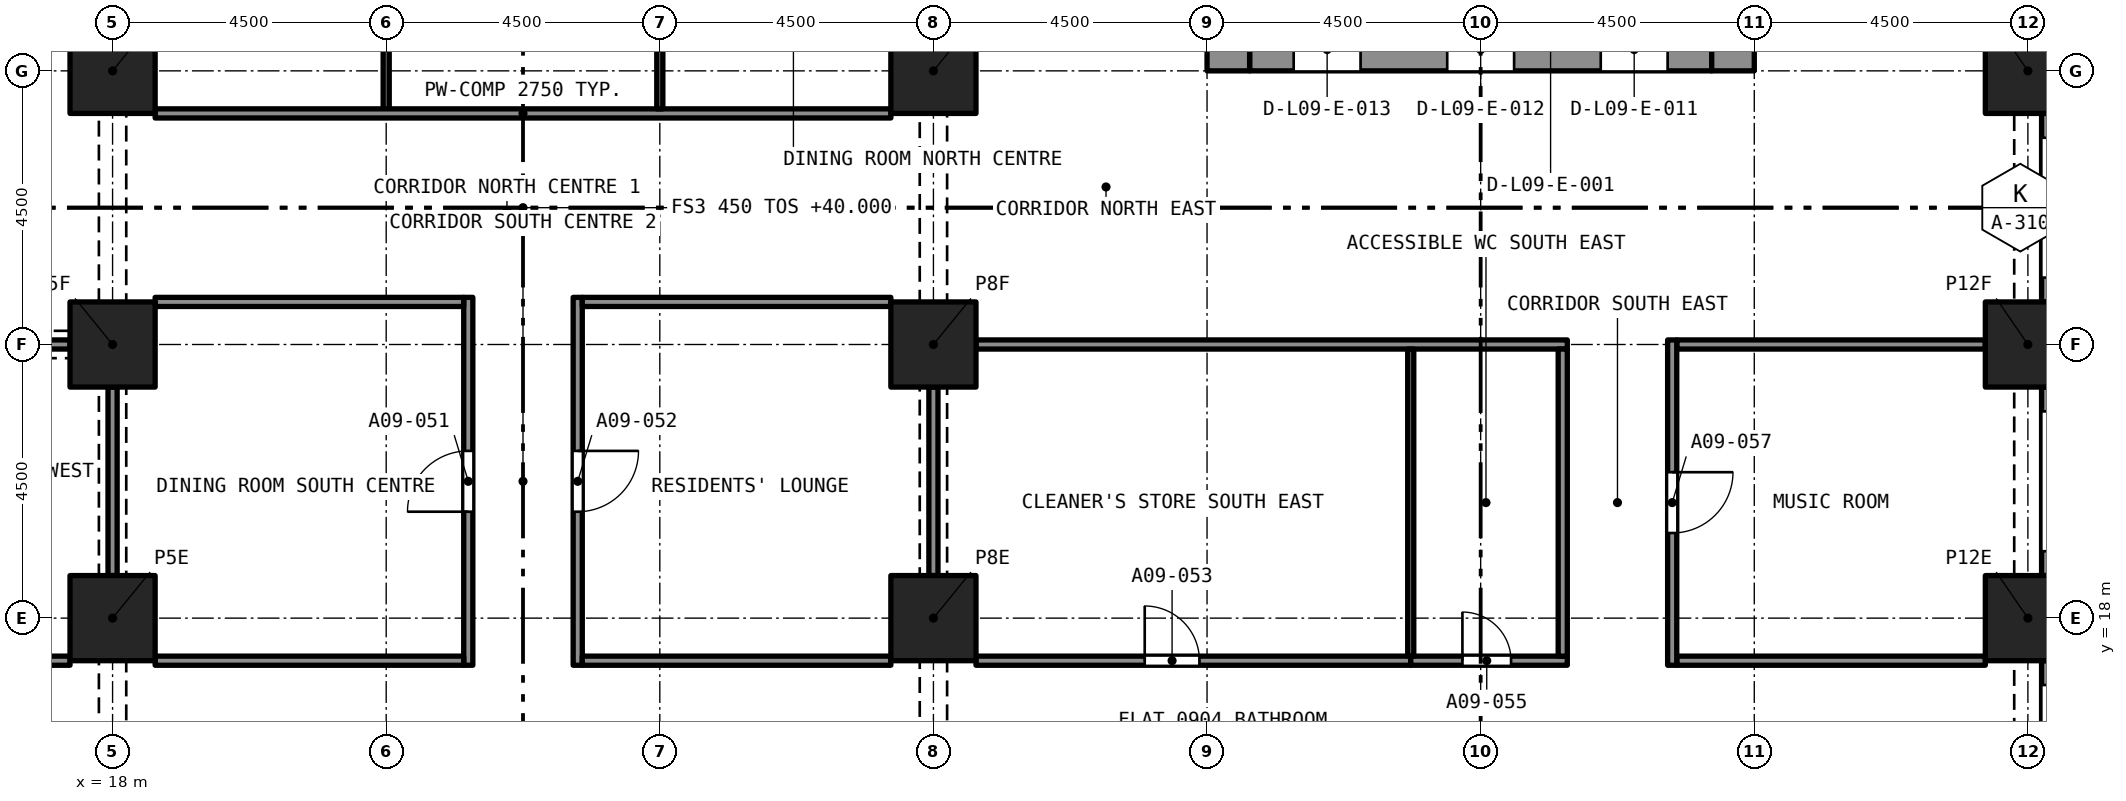
"""IFC4 building model, lengths in metres.
Left out: names, types, materials, properties, quantities, classifications, styles, units other than length and angle.
Written with IfcOpenShell. Run it as: python <this file> out.ifc"""

import sys

from ifc_helpers import new_model, si_unit, direction, frame, frame_2d, origin, origin_2d, place, context, subcontext, project, spatial, rectangle, extrude, element, fill, save


model = new_model("IFC4")
c1 = context("Model", 3, precision=1e-05, world=origin(), true_north=direction((0.0, 1.0)))
c2 = subcontext(c1, "Body", "Model", "MODEL_VIEW")
j1 = project(units=[si_unit("LENGTHUNIT", "METRE"), si_unit("PLANEANGLEUNIT", "RADIAN")], contexts=[c1])
p1 = place(None, origin())
s1 = spatial("IfcSite", under=j1, at=p1, CompositionType="ELEMENT")
p2 = place(p1, origin())
s2 = spatial("IfcBuilding", under=s1, at=p2, CompositionType="ELEMENT")
p3 = place(p2, frame((0.0, 0.0, 40.0)))
s3 = spatial("IfcBuildingStorey", under=s2, at=p3, CompositionType="ELEMENT", Elevation=40.0)
for number, where, z_axis, x_axis in (
    (1, (18.0, 18.0, 0.0), (0.0, 0.0, 1.0), (1.0, 0.0, 0.0)),
    (2, (31.5, 18.0, 0.0), (0.0, 0.0, 1.0), (1.0, 0.0, 0.0)),
    (3, (49.5, 18.0, 0.0), (0.0, 0.0, 1.0), (1.0, 0.0, 0.0)),
    (4, (18.0, 22.5, 0.0), (0.0, 0.0, 1.0), (1.0, 0.0, 0.0)),
    (5, (31.5, 22.5, 0.0), (0.0, 0.0, 1.0), (1.0, 0.0, 0.0)),
    (6, (49.5, 22.5, 0.0), (0.0, 0.0, 1.0), (1.0, 0.0, 0.0)),
    (7, (18.0, 27.0, 0.0), (0.0, 0.0, 1.0), (1.0, 0.0, 0.0)),
    (8, (31.5, 27.0, 0.0), (0.0, 0.0, 1.0), (1.0, 0.0, 0.0)),
    (9, (49.5, 27.0, 0.0), (0.0, 0.0, 1.0), (1.0, 0.0, 0.0)),
):
    element("IfcColumn", number, at=place(p3, frame(where, z_axis=z_axis, x_axis=x_axis)), inside=s3, PredefinedType="COLUMN", context=c2, shape_type="SweptSolid", body=[
        extrude(rectangle(XDim=1.4, YDim=1.4, at=origin_2d()), origin(), (0.0, 0.0, 1.0), 3.2),
    ])
p4 = place(p3, frame((36.7, 27.35, 0.0), z_axis=(0.0, 0.0, 1.0), x_axis=(1.0, 0.0, 0.0)))
e10 = element("IfcWall", 10, at=p4, inside=s3, PredefinedType="SOLIDWALL", context=c2, shape_type="SweptSolid", body=[
    extrude(rectangle(XDim=7.6, YDim=0.7, at=frame_2d((3.8, 0.0))), origin(), (0.0, 0.0, 1.0), 3.2),
])
p5 = place(p4, frame((5.775, 0.0, 0.0)))
e11 = element("IfcOpeningElement", 11, at=p5, cuts=e10, PredefinedType="OPENING", context=c2, shape_type="SweptSolid", body=[
    extrude(rectangle(XDim=1.1, YDim=2.1, at=frame_2d((0.55, 1.05))), frame((0.0, 0.36, 0.0), z_axis=(0.0, -1.0, 0.0), x_axis=(1.0, 0.0, 0.0)), (0.0, 0.0, 1.0), 0.72),
])
p6 = place(p4, frame((3.25, 0.0, 0.0)))
e12 = element("IfcOpeningElement", 12, at=p6, cuts=e10, PredefinedType="OPENING", context=c2, shape_type="SweptSolid", body=[
    extrude(rectangle(XDim=1.1, YDim=2.1, at=frame_2d((0.55, 1.05))), frame((0.0, 0.36, 0.0), z_axis=(0.0, -1.0, 0.0), x_axis=(1.0, 0.0, 0.0)), (0.0, 0.0, 1.0), 0.72),
])
p7 = place(p4, frame((0.725, 0.0, 0.0)))
e13 = element("IfcOpeningElement", 13, at=p7, cuts=e10, PredefinedType="OPENING", context=c2, shape_type="SweptSolid", body=[
    extrude(rectangle(XDim=1.1, YDim=2.1, at=frame_2d((0.55, 1.05))), frame((0.0, 0.36, 0.0), z_axis=(0.0, -1.0, 0.0), x_axis=(1.0, 0.0, 0.0)), (0.0, 0.0, 1.0), 0.72),
])
p8 = place(p3, frame((36.35, 27.0, 0.0), z_axis=(0.0, 0.0, 1.0), x_axis=(0.0, 1.0, 0.0)))
e14 = element("IfcWall", 14, at=p8, inside=s3, PredefinedType="SOLIDWALL", context=c2, shape_type="SweptSolid", body=[
    extrude(rectangle(XDim=13.5, YDim=0.7, at=frame_2d((6.75, 0.0))), origin(), (0.0, 0.0, 1.0), 3.2),
])
p9 = place(p8, frame((8.95, 0.0, 0.0)))
e15 = element("IfcOpeningElement", 15, at=p9, cuts=e14, PredefinedType="OPENING", context=c2, shape_type="SweptSolid", body=[
    extrude(rectangle(XDim=1.2, YDim=2.1, at=frame_2d((0.6, 1.05))), frame((0.0, 0.36, 0.0), z_axis=(0.0, -1.0, 0.0), x_axis=(1.0, 0.0, 0.0)), (0.0, 0.0, 1.0), 0.72),
])
p10 = place(p3, frame((44.65, 27.0, 0.0), z_axis=(0.0, 0.0, 1.0), x_axis=(0.0, 1.0, 0.0)))
e16 = element("IfcWall", 16, at=p10, inside=s3, PredefinedType="SOLIDWALL", context=c2, shape_type="SweptSolid", body=[
    extrude(rectangle(XDim=13.5, YDim=0.7, at=frame_2d((6.75, 0.0))), origin(), (0.0, 0.0, 1.0), 3.2),
])
p11 = place(p10, frame((8.95, 0.0, 0.0)))
e17 = element("IfcOpeningElement", 17, at=p11, cuts=e16, PredefinedType="OPENING", context=c2, shape_type="SweptSolid", body=[
    extrude(rectangle(XDim=1.2, YDim=2.1, at=frame_2d((0.6, 1.05))), frame((0.0, 0.36, 0.0), z_axis=(0.0, -1.0, 0.0), x_axis=(1.0, 0.0, 0.0)), (0.0, 0.0, 1.0), 0.72),
])
p12 = place(p3, frame((49.875, 17.3, 0.0), z_axis=(0.0, 0.0, 1.0), x_axis=(0.0, -1.0, 0.0)))
e18 = element("IfcWall", 18, at=p12, inside=s3, PredefinedType="SOLIDWALL", context=c2, shape_type="SweptSolid", body=[
    extrude(rectangle(XDim=3.1, YDim=0.3, at=frame_2d((1.55, 0.0))), origin(), (0.0, 0.0, 1.0), 3.2),
])
p13 = place(p12, frame((0.4, 0.0, 0.45)))
e19 = element("IfcOpeningElement", 19, at=p13, cuts=e18, PredefinedType="OPENING", context=c2, shape_type="SweptSolid", body=[
    extrude(rectangle(XDim=2.3, YDim=1.95, at=frame_2d((1.15, 0.975))), frame((0.0, 0.16, 0.0), z_axis=(0.0, -1.0, 0.0), x_axis=(1.0, 0.0, 0.0)), (0.0, 0.0, 1.0), 0.32),
])
p14 = place(p3, frame((49.875, 21.8, 0.0), z_axis=(0.0, 0.0, 1.0), x_axis=(0.0, -1.0, 0.0)))
e20 = element("IfcWall", 20, at=p14, inside=s3, PredefinedType="SOLIDWALL", context=c2, shape_type="SweptSolid", body=[
    extrude(rectangle(XDim=3.1, YDim=0.3, at=frame_2d((1.55, 0.0))), origin(), (0.0, 0.0, 1.0), 3.2),
])
p15 = place(p14, frame((0.4, 0.0, 0.45)))
e21 = element("IfcOpeningElement", 21, at=p15, cuts=e20, PredefinedType="OPENING", context=c2, shape_type="SweptSolid", body=[
    extrude(rectangle(XDim=2.3, YDim=1.95, at=frame_2d((1.15, 0.975))), frame((0.0, 0.16, 0.0), z_axis=(0.0, -1.0, 0.0), x_axis=(1.0, 0.0, 0.0)), (0.0, 0.0, 1.0), 0.32),
])
p16 = place(p3, frame((49.875, 26.3, 0.0), z_axis=(0.0, 0.0, 1.0), x_axis=(0.0, -1.0, 0.0)))
e22 = element("IfcWall", 22, at=p16, inside=s3, PredefinedType="SOLIDWALL", context=c2, shape_type="SweptSolid", body=[
    extrude(rectangle(XDim=3.1, YDim=0.3, at=frame_2d((1.55, 0.0))), origin(), (0.0, 0.0, 1.0), 3.2),
])
p17 = place(p16, frame((0.4, 0.0, 0.45)))
e23 = element("IfcOpeningElement", 23, at=p17, cuts=e22, PredefinedType="OPENING", context=c2, shape_type="SweptSolid", body=[
    extrude(rectangle(XDim=2.3, YDim=1.95, at=frame_2d((1.15, 0.975))), frame((0.0, 0.16, 0.0), z_axis=(0.0, -1.0, 0.0), x_axis=(1.0, 0.0, 0.0)), (0.0, 0.0, 1.0), 0.32),
])
p18 = place(p3, frame((23.85, 17.225, 0.0), z_axis=(0.0, 0.0, 1.0), x_axis=(0.0, 1.0, 0.0)))
e24 = element("IfcWall", 24, at=p18, inside=s3, PredefinedType="PARTITIONING", context=c2, shape_type="SweptSolid", body=[
    extrude(rectangle(XDim=6.05, YDim=0.15, at=frame_2d((3.025, 0.0))), origin(), (0.0, 0.0, 1.0), 2.75),
])
p19 = place(p18, frame((2.525, 0.0, 0.0)))
e25 = element("IfcOpeningElement", 25, at=p19, cuts=e24, PredefinedType="OPENING", context=c2, shape_type="SweptSolid", body=[
    extrude(rectangle(XDim=1.0, YDim=2.1, at=frame_2d((0.5, 1.05))), frame((0.0, 0.085, 0.0), z_axis=(0.0, -1.0, 0.0), x_axis=(1.0, 0.0, 0.0)), (0.0, 0.0, 1.0), 0.17),
])
p20 = place(p3, frame((25.65, 23.275, 0.0), z_axis=(0.0, 0.0, 1.0), x_axis=(0.0, -1.0, 0.0)))
e26 = element("IfcWall", 26, at=p20, inside=s3, PredefinedType="PARTITIONING", context=c2, shape_type="SweptSolid", body=[
    extrude(rectangle(XDim=6.05, YDim=0.15, at=frame_2d((3.025, 0.0))), origin(), (0.0, 0.0, 1.0), 2.75),
])
p21 = place(p20, frame((2.525, 0.0, 0.0)))
e27 = element("IfcOpeningElement", 27, at=p21, cuts=e26, PredefinedType="OPENING", context=c2, shape_type="SweptSolid", body=[
    extrude(rectangle(XDim=1.0, YDim=2.1, at=frame_2d((0.5, 1.05))), frame((0.0, 0.085, 0.0), z_axis=(0.0, -1.0, 0.0), x_axis=(1.0, 0.0, 0.0)), (0.0, 0.0, 1.0), 0.17),
])
for number, where, z_axis, x_axis in (
    (28, (18.7, 17.3, 0.0), (0.0, 0.0, 1.0), (1.0, 0.0, 0.0)),
    (29, (25.725, 17.3, 0.0), (0.0, 0.0, 1.0), (1.0, 0.0, 0.0)),
):
    element("IfcWall", number, at=place(p3, frame(where, z_axis=z_axis, x_axis=x_axis)), inside=s3, PredefinedType="PARTITIONING", context=c2, shape_type="SweptSolid", body=[
        extrude(rectangle(XDim=5.075, YDim=0.15, at=frame_2d((2.538, 0.0))), origin(), (0.0, 0.0, 1.0), 2.75),
    ])
p22 = place(p3, frame((32.2, 17.3, 0.0), z_axis=(0.0, 0.0, 1.0), x_axis=(1.0, 0.0, 0.0)))
e30 = element("IfcWall", 30, at=p22, inside=s3, PredefinedType="PARTITIONING", context=c2, shape_type="SweptSolid", body=[
    extrude(rectangle(XDim=7.15, YDim=0.15, at=frame_2d((3.575, 0.0))), origin(), (0.0, 0.0, 1.0), 2.9),
])
p23 = place(p22, frame((2.775, 0.0, 0.0)))
e31 = element("IfcOpeningElement", 31, at=p23, cuts=e30, PredefinedType="OPENING", context=c2, shape_type="SweptSolid", body=[
    extrude(rectangle(XDim=0.9, YDim=2.1, at=frame_2d((0.45, 1.05))), frame((0.0, 0.085, 0.0), z_axis=(0.0, -1.0, 0.0), x_axis=(1.0, 0.0, 0.0)), (0.0, 0.0, 1.0), 0.17),
])
p24 = place(p3, frame((10.15, 17.3, 0.0), z_axis=(0.0, 0.0, 1.0), x_axis=(1.0, 0.0, 0.0)))
e32 = element("IfcWall", 32, at=p24, inside=s3, PredefinedType="PARTITIONING", context=c2, shape_type="SweptSolid", body=[
    extrude(rectangle(XDim=7.15, YDim=0.15, at=frame_2d((3.575, 0.0))), origin(), (0.0, 0.0, 1.0), 2.9),
])
p25 = place(p24, frame((3.475, 0.0, 0.0)))
e33 = element("IfcOpeningElement", 33, at=p25, cuts=e32, PredefinedType="OPENING", context=c2, shape_type="SweptSolid", body=[
    extrude(rectangle(XDim=0.9, YDim=2.1, at=frame_2d((0.45, 1.05))), frame((0.0, 0.085, 0.0), z_axis=(0.0, -1.0, 0.0), x_axis=(1.0, 0.0, 0.0)), (0.0, 0.0, 1.0), 0.17),
])
p26 = place(p3, frame((39.35, 17.3, 0.0), z_axis=(0.0, 0.0, 1.0), x_axis=(1.0, 0.0, 0.0)))
e34 = element("IfcWall", 34, at=p26, inside=s3, PredefinedType="PARTITIONING", context=c2, shape_type="SweptSolid", body=[
    extrude(rectangle(XDim=2.575, YDim=0.15, at=frame_2d((1.288, 0.0))), origin(), (0.0, 0.0, 1.0), 2.9),
])
p27 = place(p26, frame((0.85, 0.0, 0.0)))
e35 = element("IfcOpeningElement", 35, at=p27, cuts=e34, PredefinedType="OPENING", context=c2, shape_type="SweptSolid", body=[
    extrude(rectangle(XDim=0.8, YDim=2.1, at=frame_2d((0.4, 1.05))), frame((0.0, 0.085, 0.0), z_axis=(0.0, -1.0, 0.0), x_axis=(1.0, 0.0, 0.0)), (0.0, 0.0, 1.0), 0.17),
])
p28 = place(p3, frame((43.725, 17.3, 0.0), z_axis=(0.0, 0.0, 1.0), x_axis=(1.0, 0.0, 0.0)))
e36 = element("IfcWall", 36, at=p28, inside=s3, PredefinedType="PARTITIONING", context=c2, shape_type="SweptSolid", body=[
    extrude(rectangle(XDim=5.075, YDim=0.15, at=frame_2d((2.538, 0.0))), origin(), (0.0, 0.0, 1.0), 2.9),
])
p29 = place(p3, frame((22.5, 26.375, 0.0), z_axis=(0.0, 0.0, 1.0), x_axis=(0.0, 1.0, 0.0)))
e37 = element("IfcWall", 37, at=p29, inside=s3, PredefinedType="PARTITIONING", context=c2, shape_type="SweptSolid", body=[
    extrude(rectangle(XDim=10.25, YDim=0.1, at=frame_2d((5.125, 0.0))), origin(), (0.0, 0.0, 1.0), 2.75),
])
p30 = place(p3, frame((18.7, 26.3, 0.0), z_axis=(0.0, 0.0, 1.0), x_axis=(1.0, 0.0, 0.0)))
e38 = element("IfcWall", 38, at=p30, inside=s3, PredefinedType="PARTITIONING", context=c2, shape_type="SweptSolid", body=[
    extrude(rectangle(XDim=12.1, YDim=0.15, at=frame_2d((6.05, 0.0))), origin(), (0.0, 0.0, 1.0), 2.75),
])
p31 = place(p3, frame((27.0, 26.375, 0.0), z_axis=(0.0, 0.0, 1.0), x_axis=(0.0, 1.0, 0.0)))
e39 = element("IfcWall", 39, at=p31, inside=s3, PredefinedType="PARTITIONING", context=c2, shape_type="SweptSolid", body=[
    extrude(rectangle(XDim=10.25, YDim=0.1, at=frame_2d((5.125, 0.0))), origin(), (0.0, 0.0, 1.0), 2.75),
])
p32 = place(p3, frame((18.7, 23.2, 0.0), z_axis=(0.0, 0.0, 1.0), x_axis=(1.0, 0.0, 0.0)))
e40 = element("IfcWall", 40, at=p32, inside=s3, PredefinedType="PARTITIONING", context=c2, shape_type="SweptSolid", body=[
    extrude(rectangle(XDim=5.075, YDim=0.15, at=frame_2d((2.538, 0.0))), origin(), (0.0, 0.0, 1.0), 2.75),
])
p33 = place(p3, frame((18.0, 18.7, 0.0), z_axis=(0.0, 0.0, 1.0), x_axis=(0.0, 1.0, 0.0)))
e41 = element("IfcWall", 41, at=p33, inside=s3, PredefinedType="PARTITIONING", context=c2, shape_type="SweptSolid", body=[
    extrude(rectangle(XDim=3.1, YDim=0.15, at=frame_2d((1.55, 0.0))), origin(), (0.0, 0.0, 1.0), 2.38),
])
p34 = place(p3, frame((25.725, 23.2, 0.0), z_axis=(0.0, 0.0, 1.0), x_axis=(1.0, 0.0, 0.0)))
e42 = element("IfcWall", 42, at=p34, inside=s3, PredefinedType="PARTITIONING", context=c2, shape_type="SweptSolid", body=[
    extrude(rectangle(XDim=5.075, YDim=0.15, at=frame_2d((2.538, 0.0))), origin(), (0.0, 0.0, 1.0), 2.75),
])
p35 = place(p3, frame((31.5, 18.7, 0.0), z_axis=(0.0, 0.0, 1.0), x_axis=(0.0, 1.0, 0.0)))
e43 = element("IfcWall", 43, at=p35, inside=s3, PredefinedType="PARTITIONING", context=c2, shape_type="SweptSolid", body=[
    extrude(rectangle(XDim=3.1, YDim=0.15, at=frame_2d((1.55, 0.0))), origin(), (0.0, 0.0, 1.0), 2.38),
])
p36 = place(p3, frame((32.2, 22.5, 0.0), z_axis=(0.0, 0.0, 1.0), x_axis=(1.0, 0.0, 0.0)))
e44 = element("IfcWall", 44, at=p36, inside=s3, PredefinedType="PARTITIONING", context=c2, shape_type="SweptSolid", body=[
    extrude(rectangle(XDim=9.725, YDim=0.15, at=frame_2d((4.863, 0.0))), origin(), (0.0, 0.0, 1.0), 2.9),
])
p37 = place(p3, frame((43.725, 22.5, 0.0), z_axis=(0.0, 0.0, 1.0), x_axis=(1.0, 0.0, 0.0)))
e45 = element("IfcWall", 45, at=p37, inside=s3, PredefinedType="PARTITIONING", context=c2, shape_type="SweptSolid", body=[
    extrude(rectangle(XDim=5.075, YDim=0.15, at=frame_2d((2.538, 0.0))), origin(), (0.0, 0.0, 1.0), 2.9),
])
p38 = place(p3, frame((14.2, 22.5, 0.0), z_axis=(0.0, 0.0, 1.0), x_axis=(1.0, 0.0, 0.0)))
e46 = element("IfcWall", 46, at=p38, inside=s3, PredefinedType="PARTITIONING", context=c2, shape_type="SweptSolid", body=[
    extrude(rectangle(XDim=3.1, YDim=0.15, at=frame_2d((1.55, 0.0))), origin(), (0.0, 0.0, 1.0), 2.38),
])
p39 = place(p3, frame((41.85, 17.375, 0.0), z_axis=(0.0, 0.0, 1.0), x_axis=(0.0, 1.0, 0.0)))
e47 = element("IfcWall", 47, at=p39, inside=s3, PredefinedType="PARTITIONING", context=c2, shape_type="SweptSolid", body=[
    extrude(rectangle(XDim=5.05, YDim=0.15, at=frame_2d((2.525, 0.0))), origin(), (0.0, 0.0, 1.0), 2.9),
])
p40 = place(p3, frame((43.65, 22.575, 0.0), z_axis=(0.0, 0.0, 1.0), x_axis=(0.0, -1.0, 0.0)))
e48 = element("IfcWall", 48, at=p40, inside=s3, PredefinedType="PARTITIONING", context=c2, shape_type="SweptSolid", body=[
    extrude(rectangle(XDim=5.35, YDim=0.15, at=frame_2d((2.675, 0.0))), origin(), (0.0, 0.0, 1.0), 2.9),
])
p41 = place(p40, frame((2.175, 0.0, 0.0)))
e49 = element("IfcOpeningElement", 49, at=p41, cuts=e48, PredefinedType="OPENING", context=c2, shape_type="SweptSolid", body=[
    extrude(rectangle(XDim=1.0, YDim=2.1, at=frame_2d((0.5, 1.05))), frame((0.0, 0.085, 0.0), z_axis=(0.0, -1.0, 0.0), x_axis=(1.0, 0.0, 0.0)), (0.0, 0.0, 1.0), 0.17),
])
p42 = place(p3, frame((39.35, 17.375, 0.0), z_axis=(0.0, 0.0, 1.0), x_axis=(0.0, 1.0, 0.0)))
e50 = element("IfcWall", 50, at=p42, inside=s3, PredefinedType="PARTITIONING", context=c2, shape_type="SweptSolid", body=[
    extrude(rectangle(XDim=5.05, YDim=0.1, at=frame_2d((2.525, 0.0))), origin(), (0.0, 0.0, 1.0), 2.9),
])
p43 = place(p19, origin())
e51 = element("IfcDoor", 51, at=p43, inside=s3, OperationType="SINGLE_SWING_RIGHT", PredefinedType="DOOR", context=c2, shape_type="SweptSolid", body=[
    extrude(rectangle(XDim=1.0, YDim=2.1, at=frame_2d((0.5, 1.05))), frame((0.0, 0.025, 0.0), z_axis=(0.0, -1.0, 0.0), x_axis=(1.0, 0.0, 0.0)), (0.0, 0.0, 1.0), 0.05),
])
fill(e25, e51)
p44 = place(p21, origin())
e52 = element("IfcDoor", 52, at=p44, inside=s3, OperationType="SINGLE_SWING_RIGHT", PredefinedType="DOOR", context=c2, shape_type="SweptSolid", body=[
    extrude(rectangle(XDim=1.0, YDim=2.1, at=frame_2d((0.5, 1.05))), frame((0.0, 0.025, 0.0), z_axis=(0.0, -1.0, 0.0), x_axis=(1.0, 0.0, 0.0)), (0.0, 0.0, 1.0), 0.05),
])
fill(e27, e52)
p45 = place(p23, origin())
e53 = element("IfcDoor", 53, at=p45, inside=s3, OperationType="SINGLE_SWING_LEFT", PredefinedType="DOOR", context=c2, shape_type="SweptSolid", body=[
    extrude(rectangle(XDim=0.9, YDim=2.1, at=frame_2d((0.45, 1.05))), frame((0.0, 0.025, 0.0), z_axis=(0.0, -1.0, 0.0), x_axis=(1.0, 0.0, 0.0)), (0.0, 0.0, 1.0), 0.05),
])
fill(e31, e53)
p46 = place(p27, origin())
e54 = element("IfcDoor", 54, at=p46, inside=s3, OperationType="SINGLE_SWING_LEFT", PredefinedType="DOOR", context=c2, shape_type="SweptSolid", body=[
    extrude(rectangle(XDim=0.8, YDim=2.1, at=frame_2d((0.4, 1.05))), frame((0.0, 0.025, 0.0), z_axis=(0.0, -1.0, 0.0), x_axis=(1.0, 0.0, 0.0)), (0.0, 0.0, 1.0), 0.05),
])
fill(e35, e54)
p47 = place(p41, origin())
e55 = element("IfcDoor", 55, at=p47, inside=s3, OperationType="SINGLE_SWING_RIGHT", PredefinedType="DOOR", context=c2, shape_type="SweptSolid", body=[
    extrude(rectangle(XDim=1.0, YDim=2.1, at=frame_2d((0.5, 1.05))), frame((0.0, 0.025, 0.0), z_axis=(0.0, -1.0, 0.0), x_axis=(1.0, 0.0, 0.0)), (0.0, 0.0, 1.0), 0.05),
])
fill(e49, e55)
save(model, sys.argv[1])
